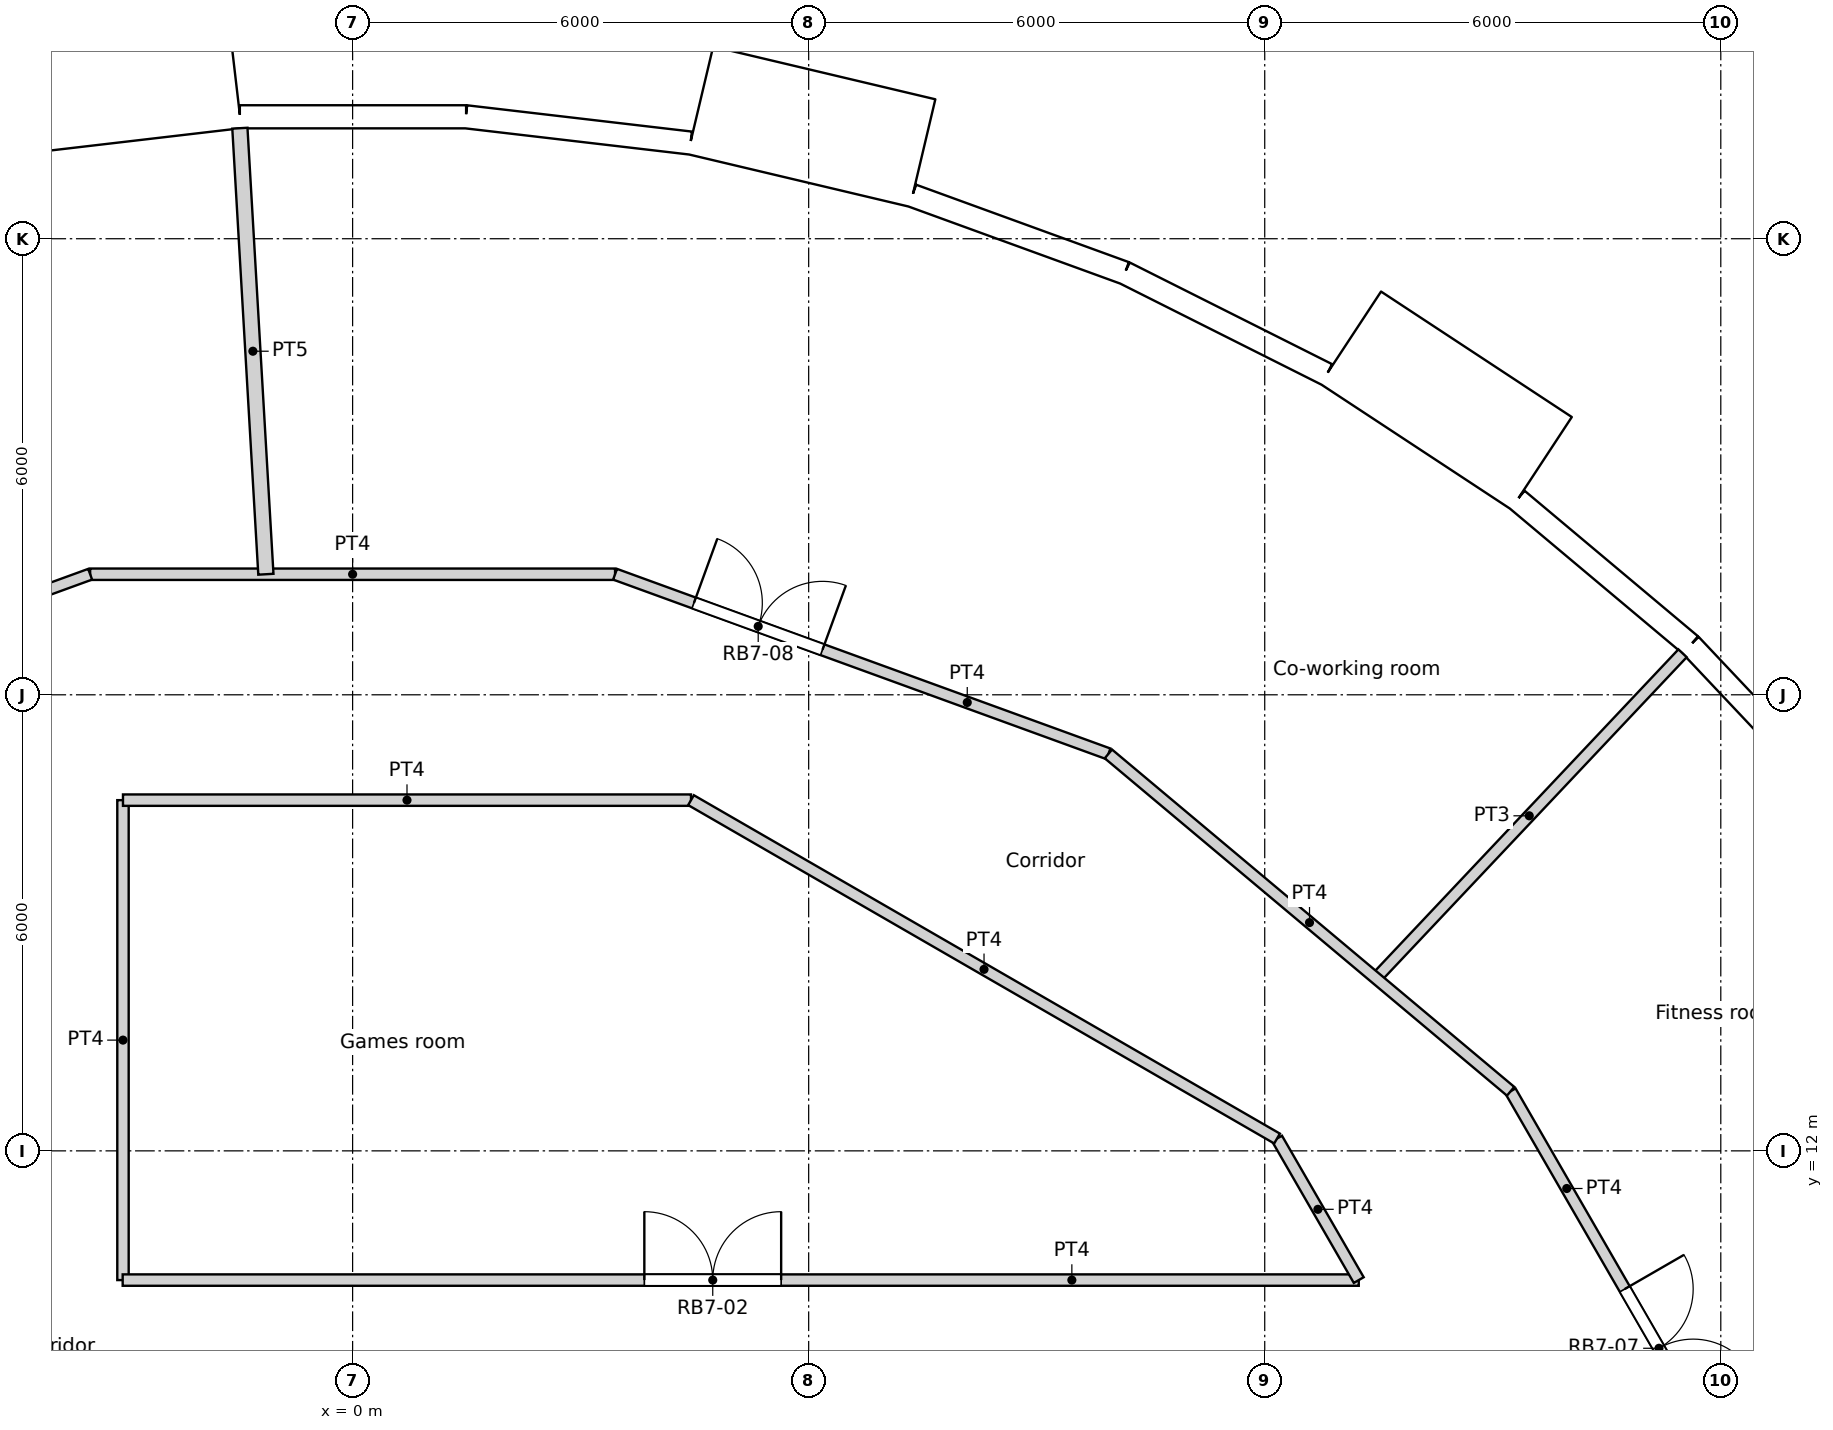
"""IFC4 building model, lengths in metres.
Left out: names, types, materials, properties, quantities, classifications, styles, units other than length and angle.
Written with IfcOpenShell. Run it as: python <this file> out.ifc"""

import sys

from ifc_helpers import new_model, si_unit, direction, frame, frame_2d, origin, origin_2d, place, context, subcontext, project, spatial, rectangle, circle, extrude, element, fill, save


model = new_model("IFC4")
c1 = context("Model", 3, precision=1e-05, world=origin(), true_north=direction((0.0, 1.0)))
c2 = subcontext(c1, "Body", "Model", "MODEL_VIEW")
j1 = project(units=[si_unit("LENGTHUNIT", "METRE"), si_unit("PLANEANGLEUNIT", "RADIAN")], contexts=[c1])
p1 = place(None, origin())
s1 = spatial("IfcSite", under=j1, at=p1, CompositionType="ELEMENT")
p2 = place(p1, origin())
s2 = spatial("IfcBuilding", under=s1, at=p2, CompositionType="ELEMENT")
p3 = place(p2, frame((0.0, 0.0, 190.8)))
s3 = spatial("IfcBuildingStorey", under=s2, at=p3, CompositionType="ELEMENT", Elevation=190.8)
for number, where, z_axis, x_axis in (
    (1, (18.805, 15.779, 0.0), (0.0, 0.0, 1.0), (1.0, 0.0, 0.0)),
    (2, (14.659, 19.69, 0.0), (0.0, 0.0, 1.0), (1.0, 0.0, 0.0)),
    (3, (9.723, 22.54, 0.0), (0.0, 0.0, 1.0), (1.0, 0.0, 0.0)),
    (4, (4.263, 24.175, 0.0), (0.0, 0.0, 1.0), (1.0, 0.0, 0.0)),
    (5, (-1.427, 24.506, 0.0), (0.0, 0.0, 1.0), (1.0, 0.0, 0.0)),
):
    element("IfcColumn", number, at=place(p3, frame(where, z_axis=z_axis, x_axis=x_axis)), inside=s3, PredefinedType="COLUMN", context=c2, shape_type="SweptSolid", body=[
        extrude(circle(Radius=0.6, at=origin_2d()), origin(), (0.0, 0.0, 1.0), 3.6),
    ])
for number, where, z_axis, x_axis in (
    (6, (15.552, 10.603, 0.0), (0.0, 0.0, 1.0), (1.0, 0.0, 0.0)),
    (7, (11.735, 14.716, 0.0), (0.0, 0.0, 1.0), (1.0, 0.0, 0.0)),
    (8, (6.876, 17.521, 0.0), (0.0, 0.0, 1.0), (1.0, 0.0, 0.0)),
    (9, (1.406, 18.77, 0.0), (0.0, 0.0, 1.0), (1.0, 0.0, 0.0)),
    (10, (-4.188, 18.35, 0.0), (0.0, 0.0, 1.0), (1.0, 0.0, 0.0)),
):
    element("IfcColumn", number, at=place(p3, frame(where, z_axis=z_axis, x_axis=x_axis)), inside=s3, PredefinedType="COLUMN", context=c2, shape_type="SweptSolid", body=[
        extrude(circle(Radius=0.65, at=origin_2d()), origin(), (0.0, 0.0, 1.0), 3.6),
    ])
p4 = place(p3, frame((19.64, 16.493, 0.0), z_axis=(0.0, 0.0, 1.0), x_axis=(-0.686235184166, 0.727379730273, 0.0)))
e11 = element("IfcWall", 11, at=p4, inside=s3, PredefinedType="SOLIDWALL", context=c2, shape_type="SweptSolid", body=[
    extrude(rectangle(XDim=2.973, YDim=0.3, at=frame_2d((1.486, 0.0))), origin(), (0.0, 0.0, 1.0), 2.8),
])
p5 = place(p4, frame((1.486, 0.0, 1.55)))
e12 = element("IfcOpeningElement", 12, at=p5, cuts=e11, PredefinedType="OPENING", context=c2, shape_type="SweptSolid", body=[
    extrude(circle(Radius=0.9, at=origin_2d()), frame((0.0, 0.16, 0.0), z_axis=(0.0, -1.0, 0.0), x_axis=(1.0, 0.0, 0.0)), (0.0, 0.0, 1.0), 0.32),
])
p6 = place(p3, frame((17.6, 18.655, 0.0), z_axis=(0.0, 0.0, 1.0), x_axis=(-0.766049350637, 0.642781761089, 0.0)))
e13 = element("IfcWall", 13, at=p6, inside=s3, PredefinedType="SOLIDWALL", context=c2, shape_type="SweptSolid", body=[
    extrude(rectangle(XDim=2.973, YDim=0.3, at=frame_2d((1.486, 0.0))), origin(), (0.0, 0.0, 1.0), 3.3),
])
p7 = place(p6, frame((1.486, 0.0, 1.55)))
e14 = element("IfcOpeningElement", 14, at=p7, cuts=e13, PredefinedType="OPENING", context=c2, shape_type="SweptSolid", body=[
    extrude(circle(Radius=0.9, at=origin_2d()), frame((0.0, 0.16, 0.0), z_axis=(0.0, -1.0, 0.0), x_axis=(1.0, 0.0, 0.0)), (0.0, 0.0, 1.0), 0.32),
])
p8 = place(p3, frame((15.639, 21.048, -0.3), z_axis=(0.0, 0.0, 1.0), x_axis=(-0.835514416706, 0.549468524554, 0.0)))
e15 = element("IfcWall", 15, at=p8, inside=s3, PredefinedType="ELEMENTEDWALL", context=c2, shape_type="SweptSolid", body=[
    extrude(rectangle(XDim=3.0, YDim=1.45, at=frame_2d((1.5, 0.0))), origin(), (0.0, 0.0, 1.0), 3.6),
])
p9 = place(p8, frame((1.5, 0.0, 1.85)))
e16 = element("IfcOpeningElement", 16, at=p9, cuts=e15, PredefinedType="OPENING", context=c2, shape_type="SweptSolid", body=[
    extrude(circle(Radius=0.9, at=origin_2d()), frame((0.0, 0.735, 0.0), z_axis=(0.0, -1.0, 0.0), x_axis=(1.0, 0.0, 0.0)), (0.0, 0.0, 1.0), 1.47),
])
p10 = place(p3, frame((12.815, 22.216, 0.0), z_axis=(0.0, 0.0, 1.0), x_axis=(-0.893637442555, 0.448789618045, 0.0)))
e17 = element("IfcWall", 17, at=p10, inside=s3, PredefinedType="SOLIDWALL", context=c2, shape_type="SweptSolid", body=[
    extrude(rectangle(XDim=2.973, YDim=0.3, at=frame_2d((1.486, 0.0))), origin(), (0.0, 0.0, 1.0), 2.8),
])
p11 = place(p10, frame((1.486, 0.0, 1.55)))
e18 = element("IfcOpeningElement", 18, at=p11, cuts=e17, PredefinedType="OPENING", context=c2, shape_type="SweptSolid", body=[
    extrude(circle(Radius=0.9, at=origin_2d()), frame((0.0, 0.16, 0.0), z_axis=(0.0, -1.0, 0.0), x_axis=(1.0, 0.0, 0.0)), (0.0, 0.0, 1.0), 0.32),
])
p12 = place(p3, frame((10.158, 23.55, 0.0), z_axis=(0.0, 0.0, 1.0), x_axis=(-0.939690282133, 0.342026568652, 0.0)))
e19 = element("IfcWall", 19, at=p12, inside=s3, PredefinedType="SOLIDWALL", context=c2, shape_type="SweptSolid", body=[
    extrude(rectangle(XDim=2.973, YDim=0.3, at=frame_2d((1.486, 0.0))), origin(), (0.0, 0.0, 1.0), 3.3),
])
p13 = place(p12, frame((1.486, 0.0, 1.55)))
e20 = element("IfcOpeningElement", 20, at=p13, cuts=e19, PredefinedType="OPENING", context=c2, shape_type="SweptSolid", body=[
    extrude(circle(Radius=0.9, at=origin_2d()), frame((0.0, 0.16, 0.0), z_axis=(0.0, -1.0, 0.0), x_axis=(1.0, 0.0, 0.0)), (0.0, 0.0, 1.0), 0.32),
])
p14 = place(p3, frame((7.497, 25.127, -0.3), z_axis=(0.0, 0.0, 1.0), x_axis=(-0.973042333261, 0.23062657627, 0.0)))
e21 = element("IfcWall", 21, at=p14, inside=s3, PredefinedType="ELEMENTEDWALL", context=c2, shape_type="SweptSolid", body=[
    extrude(rectangle(XDim=3.0, YDim=1.45, at=frame_2d((1.5, 0.0))), origin(), (0.0, 0.0, 1.0), 3.6),
])
p15 = place(p14, frame((1.5, 0.0, 1.85)))
e22 = element("IfcOpeningElement", 22, at=p15, cuts=e21, PredefinedType="OPENING", context=c2, shape_type="SweptSolid", body=[
    extrude(circle(Radius=0.9, at=origin_2d()), frame((0.0, 0.735, 0.0), z_axis=(0.0, -1.0, 0.0), x_axis=(1.0, 0.0, 0.0)), (0.0, 0.0, 1.0), 1.47),
])
p16 = place(p3, frame((4.444, 25.259, 0.0), z_axis=(0.0, 0.0, 1.0), x_axis=(-0.993245010522, 0.1160359818, 0.0)))
e23 = element("IfcWall", 23, at=p16, inside=s3, PredefinedType="SOLIDWALL", context=c2, shape_type="SweptSolid", body=[
    extrude(rectangle(XDim=2.973, YDim=0.3, at=frame_2d((1.486, 0.0))), origin(), (0.0, 0.0, 1.0), 2.8),
])
p17 = place(p16, frame((1.486, 0.0, 1.55)))
e24 = element("IfcOpeningElement", 24, at=p17, cuts=e23, PredefinedType="OPENING", context=c2, shape_type="SweptSolid", body=[
    extrude(circle(Radius=0.9, at=origin_2d()), frame((0.0, 0.16, 0.0), z_axis=(0.0, -1.0, 0.0), x_axis=(1.0, 0.0, 0.0)), (0.0, 0.0, 1.0), 0.32),
])
p18 = place(p3, frame((1.491, 25.604, 0.0), z_axis=(0.0, 0.0, 1.0), x_axis=(-1.0, 0.0, 0.0)))
e25 = element("IfcWall", 25, at=p18, inside=s3, PredefinedType="SOLIDWALL", context=c2, shape_type="SweptSolid", body=[
    extrude(rectangle(XDim=2.973, YDim=0.3, at=frame_2d((1.486, 0.0))), origin(), (0.0, 0.0, 1.0), 3.3),
])
p19 = place(p18, frame((1.486, 0.0, 1.55)))
e26 = element("IfcOpeningElement", 26, at=p19, cuts=e25, PredefinedType="OPENING", context=c2, shape_type="SweptSolid", body=[
    extrude(circle(Radius=0.9, at=origin_2d()), frame((0.0, 0.16, 0.0), z_axis=(0.0, -1.0, 0.0), x_axis=(1.0, 0.0, 0.0)), (0.0, 0.0, 1.0), 0.32),
])
p20 = place(p3, frame((-1.549, 26.176, -0.3), z_axis=(0.0, 0.0, 1.0), x_axis=(-0.9932342274, -0.116128246006, 0.0)))
e27 = element("IfcWall", 27, at=p20, inside=s3, PredefinedType="ELEMENTEDWALL", context=c2, shape_type="SweptSolid", body=[
    extrude(rectangle(XDim=3.0, YDim=1.45, at=frame_2d((1.5, 0.0))), origin(), (0.0, 0.0, 1.0), 3.6),
])
p21 = place(p20, frame((1.5, 0.0, 1.85)))
e28 = element("IfcOpeningElement", 28, at=p21, cuts=e27, PredefinedType="OPENING", context=c2, shape_type="SweptSolid", body=[
    extrude(circle(Radius=0.9, at=origin_2d()), frame((0.0, 0.735, 0.0), z_axis=(0.0, -1.0, 0.0), x_axis=(1.0, 0.0, 0.0)), (0.0, 0.0, 1.0), 1.47),
])
p22 = place(p3, frame((-3.025, 10.3, 0.0), z_axis=(0.0, 0.0, 1.0), x_axis=(1.0, 0.0, 0.0)))
e29 = element("IfcWall", 29, at=p22, inside=s3, PredefinedType="PARTITIONING", context=c2, shape_type="SweptSolid", body=[
    extrude(rectangle(XDim=16.262, YDim=0.15, at=frame_2d((8.131, 0.0))), origin(), (0.0, 0.0, 1.0), 3.3),
])
p23 = place(p22, frame((6.863, 0.0, 0.0)))
e30 = element("IfcOpeningElement", 30, at=p23, cuts=e29, PredefinedType="OPENING", context=c2, shape_type="SweptSolid", body=[
    extrude(rectangle(XDim=1.8, YDim=2.1, at=frame_2d((0.9, 1.05))), frame((0.0, 0.075, 0.0), z_axis=(0.0, -1.0, 0.0), x_axis=(1.0, 0.0, 0.0)), (0.0, 0.0, 1.0), 0.15),
])
p24 = place(p3, frame((12.162, 12.162, 0.0), z_axis=(0.0, 0.0, 1.0), x_axis=(0.499961633463, -0.866047553582, 0.0)))
e31 = element("IfcWall", 31, at=p24, inside=s3, PredefinedType="PARTITIONING", context=c2, shape_type="SweptSolid", body=[
    extrude(rectangle(XDim=2.15, YDim=0.15, at=frame_2d((1.075, 0.0))), origin(), (0.0, 0.0, 1.0), 3.3),
])
p25 = place(p3, frame((9.943, 17.222, 0.0), z_axis=(0.0, 0.0, 1.0), x_axis=(0.766192104565, -0.642611592567, 0.0)))
e32 = element("IfcWall", 32, at=p25, inside=s3, PredefinedType="PARTITIONING", context=c2, shape_type="SweptSolid", body=[
    extrude(rectangle(XDim=6.906, YDim=0.15, at=frame_2d((3.453, 0.0))), origin(), (0.0, 0.0, 1.0), 3.3),
])
p26 = place(p3, frame((15.235, 12.784, 0.0), z_axis=(0.0, 0.0, 1.0), x_axis=(0.499914202267, -0.866074933462, 0.0)))
e33 = element("IfcWall", 33, at=p26, inside=s3, PredefinedType="PARTITIONING", context=c2, shape_type="SweptSolid", body=[
    extrude(rectangle(XDim=6.907, YDim=0.15, at=frame_2d((3.454, 0.0))), origin(), (0.0, 0.0, 1.0), 3.3),
])
p27 = place(p26, frame((3.004, 0.0, 0.0)))
e34 = element("IfcOpeningElement", 34, at=p27, cuts=e33, PredefinedType="OPENING", context=c2, shape_type="SweptSolid", body=[
    extrude(rectangle(XDim=1.8, YDim=2.1, at=frame_2d((0.9, 1.05))), frame((0.0, 0.075, 0.0), z_axis=(0.0, -1.0, 0.0), x_axis=(1.0, 0.0, 0.0)), (0.0, 0.0, 1.0), 0.15),
])
p28 = place(p3, frame((4.452, 16.614, 0.0), z_axis=(0.0, 0.0, 1.0), x_axis=(0.866005203721, -0.500034985904, 0.0)))
e35 = element("IfcWall", 35, at=p28, inside=s3, PredefinedType="PARTITIONING", context=c2, shape_type="SweptSolid", body=[
    extrude(rectangle(XDim=8.903, YDim=0.15, at=frame_2d((4.452, 0.0))), origin(), (0.0, 0.0, 1.0), 3.3),
])
p29 = place(p3, frame((-3.021, 16.614, 0.0), z_axis=(0.0, 0.0, 1.0), x_axis=(1.0, 0.0, 0.0)))
e36 = element("IfcWall", 36, at=p29, inside=s3, PredefinedType="PARTITIONING", context=c2, shape_type="SweptSolid", body=[
    extrude(rectangle(XDim=7.473, YDim=0.15, at=frame_2d((3.736, 0.0))), origin(), (0.0, 0.0, 1.0), 3.3),
])
p30 = place(p3, frame((-3.021, 10.3, 0.0), z_axis=(0.0, 0.0, 1.0), x_axis=(0.0, 1.0, 0.0)))
e37 = element("IfcWall", 37, at=p30, inside=s3, PredefinedType="PARTITIONING", context=c2, shape_type="SweptSolid", body=[
    extrude(rectangle(XDim=6.314, YDim=0.15, at=frame_2d((3.157, 0.0))), origin(), (0.0, 0.0, 1.0), 3.3),
])
p31 = place(p3, frame((-3.453, 19.586, 0.0), z_axis=(0.0, 0.0, 1.0), x_axis=(1.0, 0.0, 0.0)))
e38 = element("IfcWall", 38, at=p31, inside=s3, PredefinedType="PARTITIONING", context=c2, shape_type="SweptSolid", body=[
    extrude(rectangle(XDim=6.906, YDim=0.15, at=frame_2d((3.453, 0.0))), origin(), (0.0, 0.0, 1.0), 3.3),
])
p32 = place(p3, frame((3.453, 19.586, 0.0), z_axis=(0.0, 0.0, 1.0), x_axis=(0.939672634566, -0.342075050021, 0.0)))
e39 = element("IfcWall", 39, at=p32, inside=s3, PredefinedType="PARTITIONING", context=c2, shape_type="SweptSolid", body=[
    extrude(rectangle(XDim=6.908, YDim=0.15, at=frame_2d((3.454, 0.0))), origin(), (0.0, 0.0, 1.0), 3.3),
])
p33 = place(p32, frame((1.104, 0.0, 0.0)))
e40 = element("IfcOpeningElement", 40, at=p33, cuts=e39, PredefinedType="OPENING", context=c2, shape_type="SweptSolid", body=[
    extrude(rectangle(XDim=1.8, YDim=2.1, at=frame_2d((0.9, 1.05))), frame((0.0, 0.075, 0.0), z_axis=(0.0, -1.0, 0.0), x_axis=(1.0, 0.0, 0.0)), (0.0, 0.0, 1.0), 0.15),
])
p34 = place(p3, frame((-9.944, 17.223, 0.0), z_axis=(0.0, 0.0, 1.0), x_axis=(0.939672634566, 0.342075050021, 0.0)))
e41 = element("IfcWall", 41, at=p34, inside=s3, PredefinedType="PARTITIONING", context=c2, shape_type="SweptSolid", body=[
    extrude(rectangle(XDim=6.908, YDim=0.15, at=frame_2d((3.454, 0.0))), origin(), (0.0, 0.0, 1.0), 3.3),
])
p35 = place(p34, frame((2.704, 0.0, 0.0)))
e42 = element("IfcOpeningElement", 42, at=p35, cuts=e41, PredefinedType="OPENING", context=c2, shape_type="SweptSolid", body=[
    extrude(rectangle(XDim=1.5, YDim=2.1, at=frame_2d((0.75, 1.05))), frame((0.0, 0.075, 0.0), z_axis=(0.0, -1.0, 0.0), x_axis=(1.0, 0.0, 0.0)), (0.0, 0.0, 1.0), 0.15),
])
p36 = place(p3, frame((13.463, 14.27, 0.0), z_axis=(0.0, 0.0, 1.0), x_axis=(0.6862502776, 0.72736549031, 0.0)))
e43 = element("IfcWall", 43, at=p36, inside=s3, PredefinedType="PARTITIONING", context=c2, shape_type="SweptSolid", body=[
    extrude(rectangle(XDim=5.879, YDim=0.15, at=frame_2d((2.939, 0.0))), origin(), (0.0, 0.0, 1.0), 3.3),
])
p37 = place(p3, frame((-1.483, 25.454, 0.0), z_axis=(0.0, 0.0, 1.0), x_axis=(0.058147412668, -0.998308007781, 0.0)))
e44 = element("IfcWall", 44, at=p37, inside=s3, PredefinedType="PARTITIONING", context=c2, shape_type="SweptSolid", body=[
    extrude(rectangle(XDim=5.878, YDim=0.2, at=frame_2d((2.939, 0.0))), origin(), (0.0, 0.0, 1.0), 3.3),
])
p38 = place(p5, origin())
e45 = element("IfcWindow", 45, at=p38, inside=s3, PartitioningType="SINGLE_PANEL", PredefinedType="WINDOW", context=c2, shape_type="SweptSolid", body=[
    extrude(circle(Radius=0.9, at=origin_2d()), frame((0.0, 0.12, 0.0), z_axis=(0.0, -1.0, 0.0), x_axis=(1.0, 0.0, 0.0)), (0.0, 0.0, 1.0), 0.1),
])
fill(e12, e45)
p39 = place(p7, origin())
e46 = element("IfcWindow", 46, at=p39, inside=s3, PartitioningType="SINGLE_PANEL", PredefinedType="WINDOW", context=c2, shape_type="SweptSolid", body=[
    extrude(circle(Radius=0.9, at=origin_2d()), frame((0.0, 0.12, 0.0), z_axis=(0.0, -1.0, 0.0), x_axis=(1.0, 0.0, 0.0)), (0.0, 0.0, 1.0), 0.1),
])
fill(e14, e46)
p40 = place(p9, origin())
e47 = element("IfcWindow", 47, at=p40, inside=s3, PartitioningType="SINGLE_PANEL", PredefinedType="WINDOW", context=c2, shape_type="SweptSolid", body=[
    extrude(circle(Radius=0.9, at=origin_2d()), frame((0.0, 0.695, 0.0), z_axis=(0.0, -1.0, 0.0), x_axis=(1.0, 0.0, 0.0)), (0.0, 0.0, 1.0), 0.1),
])
fill(e16, e47)
p41 = place(p11, origin())
e48 = element("IfcWindow", 48, at=p41, inside=s3, PartitioningType="SINGLE_PANEL", PredefinedType="WINDOW", context=c2, shape_type="SweptSolid", body=[
    extrude(circle(Radius=0.9, at=origin_2d()), frame((0.0, 0.12, 0.0), z_axis=(0.0, -1.0, 0.0), x_axis=(1.0, 0.0, 0.0)), (0.0, 0.0, 1.0), 0.1),
])
fill(e18, e48)
p42 = place(p13, origin())
e49 = element("IfcWindow", 49, at=p42, inside=s3, PartitioningType="SINGLE_PANEL", PredefinedType="WINDOW", context=c2, shape_type="SweptSolid", body=[
    extrude(circle(Radius=0.9, at=origin_2d()), frame((0.0, 0.12, 0.0), z_axis=(0.0, -1.0, 0.0), x_axis=(1.0, 0.0, 0.0)), (0.0, 0.0, 1.0), 0.1),
])
fill(e20, e49)
p43 = place(p15, origin())
e50 = element("IfcWindow", 50, at=p43, inside=s3, PartitioningType="SINGLE_PANEL", PredefinedType="WINDOW", context=c2, shape_type="SweptSolid", body=[
    extrude(circle(Radius=0.9, at=origin_2d()), frame((0.0, 0.695, 0.0), z_axis=(0.0, -1.0, 0.0), x_axis=(1.0, 0.0, 0.0)), (0.0, 0.0, 1.0), 0.1),
])
fill(e22, e50)
p44 = place(p17, origin())
e51 = element("IfcWindow", 51, at=p44, inside=s3, PartitioningType="SINGLE_PANEL", PredefinedType="WINDOW", context=c2, shape_type="SweptSolid", body=[
    extrude(circle(Radius=0.9, at=origin_2d()), frame((0.0, 0.12, 0.0), z_axis=(0.0, -1.0, 0.0), x_axis=(1.0, 0.0, 0.0)), (0.0, 0.0, 1.0), 0.1),
])
fill(e24, e51)
p45 = place(p19, origin())
e52 = element("IfcWindow", 52, at=p45, inside=s3, PartitioningType="SINGLE_PANEL", PredefinedType="WINDOW", context=c2, shape_type="SweptSolid", body=[
    extrude(circle(Radius=0.9, at=origin_2d()), frame((0.0, 0.12, 0.0), z_axis=(0.0, -1.0, 0.0), x_axis=(1.0, 0.0, 0.0)), (0.0, 0.0, 1.0), 0.1),
])
fill(e26, e52)
p46 = place(p21, origin())
e53 = element("IfcWindow", 53, at=p46, inside=s3, PartitioningType="SINGLE_PANEL", PredefinedType="WINDOW", context=c2, shape_type="SweptSolid", body=[
    extrude(circle(Radius=0.9, at=origin_2d()), frame((0.0, 0.695, 0.0), z_axis=(0.0, -1.0, 0.0), x_axis=(1.0, 0.0, 0.0)), (0.0, 0.0, 1.0), 0.1),
])
fill(e28, e53)
p47 = place(p23, origin())
e54 = element("IfcDoor", 54, at=p47, inside=s3, OperationType="DOUBLE_DOOR_SINGLE_SWING", PredefinedType="DOOR", context=c2, shape_type="SweptSolid", body=[
    extrude(rectangle(XDim=1.8, YDim=2.1, at=frame_2d((0.9, 1.05))), frame((0.0, 0.025, 0.0), z_axis=(0.0, -1.0, 0.0), x_axis=(1.0, 0.0, 0.0)), (0.0, 0.0, 1.0), 0.05),
])
fill(e30, e54)
p48 = place(p27, origin())
e55 = element("IfcDoor", 55, at=p48, inside=s3, OperationType="DOUBLE_DOOR_SINGLE_SWING", PredefinedType="DOOR", context=c2, shape_type="SweptSolid", body=[
    extrude(rectangle(XDim=1.8, YDim=2.1, at=frame_2d((0.9, 1.05))), frame((0.0, 0.025, 0.0), z_axis=(0.0, -1.0, 0.0), x_axis=(1.0, 0.0, 0.0)), (0.0, 0.0, 1.0), 0.05),
])
fill(e34, e55)
p49 = place(p33, origin())
e56 = element("IfcDoor", 56, at=p49, inside=s3, OperationType="DOUBLE_DOOR_SINGLE_SWING", PredefinedType="DOOR", context=c2, shape_type="SweptSolid", body=[
    extrude(rectangle(XDim=1.8, YDim=2.1, at=frame_2d((0.9, 1.05))), frame((0.0, 0.025, 0.0), z_axis=(0.0, -1.0, 0.0), x_axis=(1.0, 0.0, 0.0)), (0.0, 0.0, 1.0), 0.05),
])
fill(e40, e56)
save(model, sys.argv[1])
